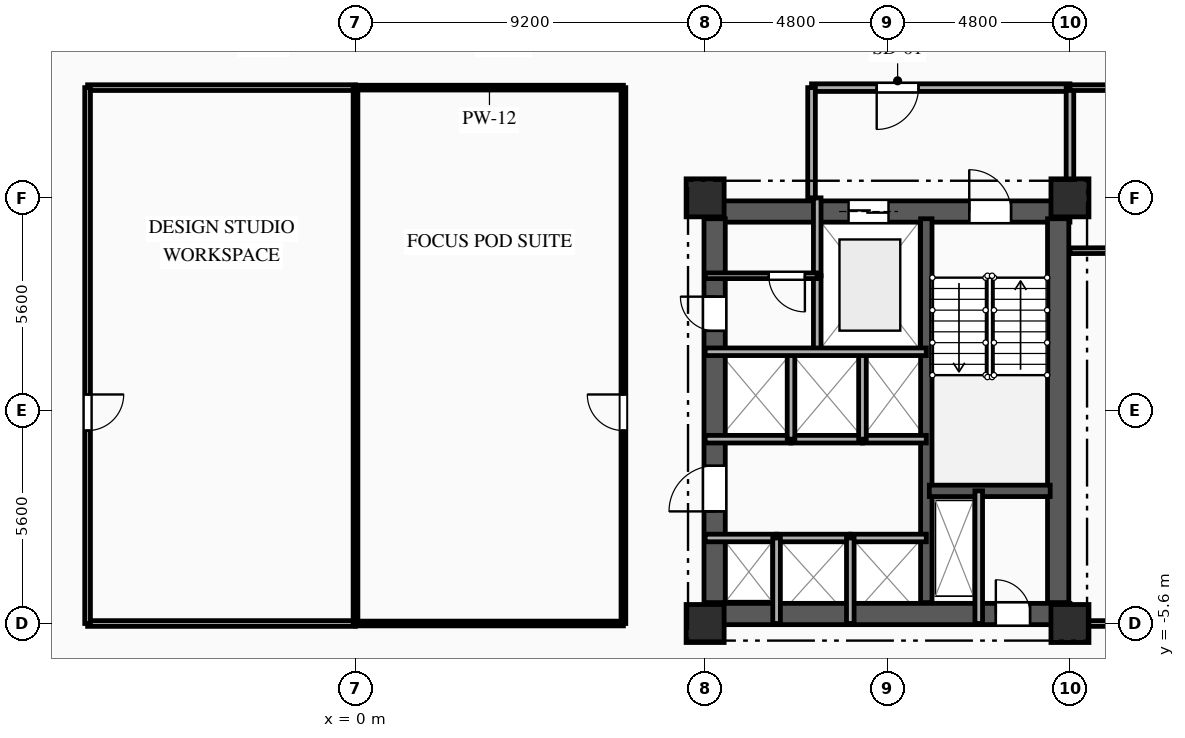
"""IFC4 building model, lengths in metres.
Left out: names, types, materials, properties, quantities, classifications, styles, units other than length and angle.
Written with IfcOpenShell. Run it as: python <this file> out.ifc"""

import sys

from ifc_helpers import new_model, si_unit, direction, frame, frame_2d, origin, origin_2d, place, context, subcontext, project, spatial, rectangle, extrude, element, fill, save


model = new_model("IFC4")
c1 = context("Model", 3, precision=1e-05, world=origin(), true_north=direction((0.0, 1.0)))
c2 = subcontext(c1, "Body", "Model", "MODEL_VIEW")
j1 = project(units=[si_unit("LENGTHUNIT", "METRE"), si_unit("PLANEANGLEUNIT", "RADIAN")], contexts=[c1])
p1 = place(None, origin())
s1 = spatial("IfcSite", under=j1, at=p1, CompositionType="ELEMENT")
p2 = place(p1, origin())
s2 = spatial("IfcBuilding", under=s1, at=p2, CompositionType="ELEMENT")
p3 = place(p2, frame((0.0, 0.0, 112.5)))
s3 = spatial("IfcBuildingStorey", under=s2, at=p3, CompositionType="ELEMENT", Elevation=112.5)
for number, where, z_axis, x_axis in (
    (1, (9.2, -5.6, 0.0), (0.0, 0.0, 1.0), (1.0, 0.0, 0.0)),
    (2, (9.2, 5.6, 0.0), (0.0, 0.0, 1.0), (1.0, 0.0, 0.0)),
    (3, (18.8, -5.6, 0.0), (0.0, 0.0, 1.0), (1.0, 0.0, 0.0)),
    (4, (18.8, 5.6, 0.0), (0.0, 0.0, 1.0), (1.0, 0.0, 0.0)),
):
    element("IfcColumn", number, at=place(p3, frame(where, z_axis=z_axis, x_axis=x_axis)), inside=s3, PredefinedType="COLUMN", context=c2, shape_type="SweptSolid", body=[
        extrude(rectangle(XDim=1.0, YDim=1.0, at=origin_2d()), origin(), (0.0, 0.0, 1.0), 3.35),
    ])
p4 = place(p3, frame((9.2, 5.24, 0.0), z_axis=(0.0, 0.0, 1.0), x_axis=(1.0, 0.0, 0.0)))
e5 = element("IfcWall", 5, at=p4, inside=s3, PredefinedType="SHEAR", context=c2, shape_type="SweptSolid", body=[
    extrude(rectangle(XDim=9.6, YDim=0.56, at=frame_2d((4.8, 0.0))), origin(), (0.0, 0.0, 1.0), 3.045),
])
p5 = place(p4, frame((6.95, 0.0, 0.0)))
e6 = element("IfcOpeningElement", 6, at=p5, cuts=e5, PredefinedType="OPENING", context=c2, shape_type="SweptSolid", body=[
    extrude(rectangle(XDim=1.1, YDim=2.15, at=frame_2d((0.55, 1.075))), frame((0.0, 0.29, 0.0), z_axis=(0.0, -1.0, 0.0), x_axis=(1.0, 0.0, 0.0)), (0.0, 0.0, 1.0), 0.58),
])
p6 = place(p4, frame((3.775, 0.0, 0.0)))
e7 = element("IfcOpeningElement", 7, at=p6, cuts=e5, PredefinedType="OPENING", context=c2, shape_type="SweptSolid", body=[
    extrude(rectangle(XDim=1.05, YDim=2.1, at=frame_2d((0.525, 1.05))), frame((0.0, 0.29, 0.0), z_axis=(0.0, -1.0, 0.0), x_axis=(1.0, 0.0, 0.0)), (0.0, 0.0, 1.0), 0.58),
])
p7 = place(p3, frame((9.2, -5.35, 0.0), z_axis=(0.0, 0.0, 1.0), x_axis=(1.0, 0.0, 0.0)))
e8 = element("IfcWall", 8, at=p7, inside=s3, PredefinedType="SHEAR", context=c2, shape_type="SweptSolid", body=[
    extrude(rectangle(XDim=9.6, YDim=0.56, at=frame_2d((4.8, 0.0))), origin(), (0.0, 0.0, 1.0), 3.045),
])
p8 = place(p7, frame((7.65, 0.0, 0.0)))
e9 = element("IfcOpeningElement", 9, at=p8, cuts=e8, PredefinedType="OPENING", context=c2, shape_type="SweptSolid", body=[
    extrude(rectangle(XDim=0.9, YDim=2.1, at=frame_2d((0.45, 1.05))), frame((0.0, 0.29, 0.0), z_axis=(0.0, -1.0, 0.0), x_axis=(1.0, 0.0, 0.0)), (0.0, 0.0, 1.0), 0.58),
])
p9 = place(p3, frame((9.45, -5.05, 0.0), z_axis=(0.0, 0.0, 1.0), x_axis=(0.0, 1.0, 0.0)))
e10 = element("IfcWall", 10, at=p9, inside=s3, PredefinedType="SHEAR", context=c2, shape_type="SweptSolid", body=[
    extrude(rectangle(XDim=10.1, YDim=0.56, at=frame_2d((5.05, 0.0))), origin(), (0.0, 0.0, 1.0), 3.045),
])
p10 = place(p9, frame((7.15, 0.0, 0.0)))
e11 = element("IfcOpeningElement", 11, at=p10, cuts=e10, PredefinedType="OPENING", context=c2, shape_type="SweptSolid", body=[
    extrude(rectangle(XDim=0.9, YDim=2.1, at=frame_2d((0.45, 1.05))), frame((0.0, 0.29, 0.0), z_axis=(0.0, -1.0, 0.0), x_axis=(1.0, 0.0, 0.0)), (0.0, 0.0, 1.0), 0.58),
])
p11 = place(p9, frame((2.4, 0.0, 0.0)))
e12 = element("IfcOpeningElement", 12, at=p11, cuts=e10, PredefinedType="OPENING", context=c2, shape_type="SweptSolid", body=[
    extrude(rectangle(XDim=1.2, YDim=2.15, at=frame_2d((0.6, 1.075))), frame((0.0, 0.29, 0.0), z_axis=(0.0, -1.0, 0.0), x_axis=(1.0, 0.0, 0.0)), (0.0, 0.0, 1.0), 0.58),
])
p12 = place(p3, frame((18.49, -5.05, 0.0), z_axis=(0.0, 0.0, 1.0), x_axis=(0.0, 1.0, 0.0)))
e13 = element("IfcWall", 13, at=p12, inside=s3, PredefinedType="SHEAR", context=c2, shape_type="SweptSolid", body=[
    extrude(rectangle(XDim=10.1, YDim=0.56, at=frame_2d((5.05, 0.0))), origin(), (0.0, 0.0, 1.0), 3.045),
])
p13 = place(p3, frame((15.02, -5.05, 0.0), z_axis=(0.0, 0.0, 1.0), x_axis=(0.0, 1.0, 0.0)))
e14 = element("IfcWall", 14, at=p13, inside=s3, PredefinedType="SHEAR", context=c2, shape_type="SweptSolid", body=[
    extrude(rectangle(XDim=10.1, YDim=0.3, at=frame_2d((5.05, 0.0))), origin(), (0.0, 0.0, 1.0), 3.045),
])
p14 = place(p3, frame((15.1, -2.11, 0.0), z_axis=(0.0, 0.0, 1.0), x_axis=(1.0, 0.0, 0.0)))
e15 = element("IfcWall", 15, at=p14, inside=s3, PredefinedType="SHEAR", context=c2, shape_type="SweptSolid", body=[
    extrude(rectangle(XDim=3.18, YDim=0.3, at=frame_2d((1.59, 0.0))), origin(), (0.0, 0.0, 1.0), 3.045),
])
p15 = place(p3, frame((16.4, -2.11, 0.0), z_axis=(0.0, 0.0, 1.0), x_axis=(0.0, -1.0, 0.0)))
e16 = element("IfcWall", 16, at=p15, inside=s3, PredefinedType="PARTITIONING", context=c2, shape_type="SweptSolid", body=[
    extrude(rectangle(XDim=3.49, YDim=0.2, at=frame_2d((1.745, 0.0))), origin(), (0.0, 0.0, 1.0), 3.045),
])
p16 = place(p3, frame((12.15, 3.55, 0.0), z_axis=(0.0, 0.0, 1.0), x_axis=(0.0, -1.0, 0.0)))
e17 = element("IfcWall", 17, at=p16, inside=s3, PredefinedType="PARTITIONING", context=c2, shape_type="SweptSolid", body=[
    extrude(rectangle(XDim=2.0, YDim=0.2, at=frame_2d((1.0, 0.0))), origin(), (0.0, 0.0, 1.0), 3.045),
])
p17 = place(p3, frame((12.15, 5.6, 0.0), z_axis=(0.0, 0.0, 1.0), x_axis=(0.0, -1.0, 0.0)))
e18 = element("IfcWall", 18, at=p17, inside=s3, PredefinedType="PARTITIONING", context=c2, shape_type="SweptSolid", body=[
    extrude(rectangle(XDim=2.05, YDim=0.2, at=frame_2d((1.025, 0.0))), origin(), (0.0, 0.0, 1.0), 3.045),
])
p18 = place(p3, frame((18.8, 8.5, 0.0), z_axis=(0.0, 0.0, 1.0), x_axis=(-1.0, 0.0, 0.0)))
e19 = element("IfcWall", 19, at=p18, inside=s3, PredefinedType="PARTITIONING", context=c2, shape_type="SweptSolid", body=[
    extrude(rectangle(XDim=6.8, YDim=0.2, at=frame_2d((3.4, 0.0))), origin(), (0.0, 0.0, 1.0), 3.045),
])
p19 = place(p18, frame((3.985, 0.0, 0.0)))
e20 = element("IfcOpeningElement", 20, at=p19, cuts=e19, PredefinedType="OPENING", context=c2, shape_type="SweptSolid", body=[
    extrude(rectangle(XDim=1.1, YDim=2.15, at=frame_2d((0.55, 1.075))), frame((0.0, 0.11, 0.0), z_axis=(0.0, -1.0, 0.0), x_axis=(1.0, 0.0, 0.0)), (0.0, 0.0, 1.0), 0.22),
])
p20 = place(p3, frame((12.0, 8.5, 0.0), z_axis=(0.0, 0.0, 1.0), x_axis=(0.0, -1.0, 0.0)))
e21 = element("IfcWall", 21, at=p20, inside=s3, PredefinedType="PARTITIONING", context=c2, shape_type="SweptSolid", body=[
    extrude(rectangle(XDim=2.9, YDim=0.2, at=frame_2d((1.45, 0.0))), origin(), (0.0, 0.0, 1.0), 3.045),
])
p21 = place(p3, frame((18.8, 5.6, 0.0), z_axis=(0.0, 0.0, 1.0), x_axis=(0.0, 1.0, 0.0)))
e22 = element("IfcWall", 22, at=p21, inside=s3, PredefinedType="PARTITIONING", context=c2, shape_type="SweptSolid", body=[
    extrude(rectangle(XDim=2.9, YDim=0.2, at=frame_2d((1.45, 0.0))), origin(), (0.0, 0.0, 1.0), 2.53),
])
p22 = place(p3, frame((12.15, 3.55, 0.0), z_axis=(0.0, 0.0, 1.0), x_axis=(-1.0, 0.0, 0.0)))
e23 = element("IfcWall", 23, at=p22, inside=s3, PredefinedType="PARTITIONING", context=c2, shape_type="SweptSolid", body=[
    extrude(rectangle(XDim=2.95, YDim=0.15, at=frame_2d((1.475, 0.0))), origin(), (0.0, 0.0, 1.0), 3.045),
])
p23 = place(p22, frame((0.325, 0.0, 0.0)))
e24 = element("IfcOpeningElement", 24, at=p23, cuts=e23, PredefinedType="OPENING", context=c2, shape_type="SweptSolid", body=[
    extrude(rectangle(XDim=0.95, YDim=2.1, at=frame_2d((0.475, 1.05))), frame((0.0, 0.085, 0.0), z_axis=(0.0, -1.0, 0.0), x_axis=(1.0, 0.0, 0.0)), (0.0, 0.0, 1.0), 0.17),
])
p24 = place(p3, frame((9.2, -3.35, 0.0), z_axis=(0.0, 0.0, 1.0), x_axis=(1.0, 0.0, 0.0)))
e25 = element("IfcWall", 25, at=p24, inside=s3, PredefinedType="PARTITIONING", context=c2, shape_type="SweptSolid", body=[
    extrude(rectangle(XDim=1.88, YDim=0.2, at=frame_2d((0.94, 0.0))), origin(), (0.0, 0.0, 1.0), 2.76),
])
p25 = place(p3, frame((11.08, -3.35, 0.0), z_axis=(0.0, 0.0, 1.0), x_axis=(1.0, 0.0, 0.0)))
e26 = element("IfcWall", 26, at=p25, inside=s3, PredefinedType="PARTITIONING", context=c2, shape_type="SweptSolid", body=[
    extrude(rectangle(XDim=1.94, YDim=0.2, at=frame_2d((0.97, 0.0))), origin(), (0.0, 0.0, 1.0), 3.045),
])
p26 = place(p3, frame((13.02, -3.35, 0.0), z_axis=(0.0, 0.0, 1.0), x_axis=(1.0, 0.0, 0.0)))
e27 = element("IfcWall", 27, at=p26, inside=s3, PredefinedType="PARTITIONING", context=c2, shape_type="SweptSolid", body=[
    extrude(rectangle(XDim=2.0, YDim=0.2, at=frame_2d((1.0, 0.0))), origin(), (0.0, 0.0, 1.0), 3.045),
])
p27 = place(p3, frame((11.46, -0.75, 0.0), z_axis=(0.0, 0.0, 1.0), x_axis=(-1.0, 0.0, 0.0)))
e28 = element("IfcWall", 28, at=p27, inside=s3, PredefinedType="PARTITIONING", context=c2, shape_type="SweptSolid", body=[
    extrude(rectangle(XDim=2.26, YDim=0.2, at=frame_2d((1.13, 0.0))), origin(), (0.0, 0.0, 1.0), 3.045),
])
p28 = place(p3, frame((13.34, -0.75, 0.0), z_axis=(0.0, 0.0, 1.0), x_axis=(-1.0, 0.0, 0.0)))
e29 = element("IfcWall", 29, at=p28, inside=s3, PredefinedType="PARTITIONING", context=c2, shape_type="SweptSolid", body=[
    extrude(rectangle(XDim=1.88, YDim=0.2, at=frame_2d((0.94, 0.0))), origin(), (0.0, 0.0, 1.0), 3.045),
])
p29 = place(p3, frame((15.02, -0.75, 0.0), z_axis=(0.0, 0.0, 1.0), x_axis=(-1.0, 0.0, 0.0)))
e30 = element("IfcWall", 30, at=p29, inside=s3, PredefinedType="PARTITIONING", context=c2, shape_type="SweptSolid", body=[
    extrude(rectangle(XDim=1.68, YDim=0.2, at=frame_2d((0.84, 0.0))), origin(), (0.0, 0.0, 1.0), 3.045),
])
for number, where, z_axis, x_axis in (
    (31, (11.08, -5.6, 0.0), (0.0, 0.0, 1.0), (0.0, 1.0, 0.0)),
    (32, (13.02, -5.6, 0.0), (0.0, 0.0, 1.0), (0.0, 1.0, 0.0)),
):
    element("IfcWall", number, at=place(p3, frame(where, z_axis=z_axis, x_axis=x_axis)), inside=s3, PredefinedType="PARTITIONING", context=c2, shape_type="SweptSolid", body=[
        extrude(rectangle(XDim=2.25, YDim=0.2, at=frame_2d((1.125, 0.0))), origin(), (0.0, 0.0, 1.0), 3.045),
    ])
for number, where, z_axis, x_axis in (
    (33, (11.46, -0.75, 0.0), (0.0, 0.0, 1.0), (0.0, 1.0, 0.0)),
    (34, (13.34, -0.75, 0.0), (0.0, 0.0, 1.0), (0.0, 1.0, 0.0)),
):
    element("IfcWall", number, at=place(p3, frame(where, z_axis=z_axis, x_axis=x_axis)), inside=s3, PredefinedType="PARTITIONING", context=c2, shape_type="SweptSolid", body=[
        extrude(rectangle(XDim=2.3, YDim=0.2, at=frame_2d((1.15, 0.0))), origin(), (0.0, 0.0, 1.0), 3.045),
    ])
p30 = place(p3, frame((0.0, 8.5, 0.0), z_axis=(0.0, 0.0, 1.0), x_axis=(-1.0, 0.0, 0.0)))
e35 = element("IfcWall", 35, at=p30, inside=s3, PredefinedType="PARTITIONING", context=c2, shape_type="SweptSolid", body=[
    extrude(rectangle(XDim=7.05, YDim=0.15, at=frame_2d((3.525, 0.0))), origin(), (0.0, 0.0, 1.0), 3.045),
])
p31 = place(p3, frame((23.0, 8.5, 0.0), z_axis=(0.0, 0.0, 1.0), x_axis=(-1.0, 0.0, 0.0)))
e36 = element("IfcWall", 36, at=p31, inside=s3, PredefinedType="PARTITIONING", context=c2, shape_type="SweptSolid", body=[
    extrude(rectangle(XDim=4.2, YDim=0.15, at=frame_2d((2.1, 0.0))), origin(), (0.0, 0.0, 1.0), 3.045),
])
p32 = place(p31, frame((0.829, 0.0, 0.0)))
e37 = element("IfcOpeningElement", 37, at=p32, cuts=e36, PredefinedType="OPENING", context=c2, shape_type="SweptSolid", body=[
    extrude(rectangle(XDim=1.05, YDim=2.15, at=frame_2d((0.525, 1.075))), frame((0.0, 0.085, 0.0), z_axis=(0.0, -1.0, 0.0), x_axis=(1.0, 0.0, 0.0)), (0.0, 0.0, 1.0), 0.17),
])
p33 = place(p3, frame((7.05, 8.5, 0.0), z_axis=(0.0, 0.0, 1.0), x_axis=(-1.0, 0.0, 0.0)))
e38 = element("IfcWall", 38, at=p33, inside=s3, PredefinedType="PARTITIONING", context=c2, shape_type="SweptSolid", body=[
    extrude(rectangle(XDim=7.05, YDim=0.125, at=frame_2d((3.525, 0.0))), origin(), (0.0, 0.0, 1.0), 3.045),
])
p34 = place(p3, frame((-7.05, -5.6, 0.0), z_axis=(0.0, 0.0, 1.0), x_axis=(1.0, 0.0, 0.0)))
e39 = element("IfcWall", 39, at=p34, inside=s3, PredefinedType="PARTITIONING", context=c2, shape_type="SweptSolid", body=[
    extrude(rectangle(XDim=7.05, YDim=0.15, at=frame_2d((3.525, 0.0))), origin(), (0.0, 0.0, 1.0), 2.53),
])
p35 = place(p3, frame((18.8, -5.6, 0.0), z_axis=(0.0, 0.0, 1.0), x_axis=(1.0, 0.0, 0.0)))
e40 = element("IfcWall", 40, at=p35, inside=s3, PredefinedType="PARTITIONING", context=c2, shape_type="SweptSolid", body=[
    extrude(rectangle(XDim=4.2, YDim=0.15, at=frame_2d((2.1, 0.0))), origin(), (0.0, 0.0, 1.0), 2.53),
])
p36 = place(p35, frame((2.321, 0.0, 0.0)))
e41 = element("IfcOpeningElement", 41, at=p36, cuts=e40, PredefinedType="OPENING", context=c2, shape_type="SweptSolid", body=[
    extrude(rectangle(XDim=1.05, YDim=2.15, at=frame_2d((0.525, 1.075))), frame((0.0, 0.085, 0.0), z_axis=(0.0, -1.0, 0.0), x_axis=(1.0, 0.0, 0.0)), (0.0, 0.0, 1.0), 0.17),
])
p37 = place(p3, frame((0.0, -5.6, 0.0), z_axis=(0.0, 0.0, 1.0), x_axis=(1.0, 0.0, 0.0)))
e42 = element("IfcWall", 42, at=p37, inside=s3, PredefinedType="PARTITIONING", context=c2, shape_type="SweptSolid", body=[
    extrude(rectangle(XDim=7.05, YDim=0.125, at=frame_2d((3.525, 0.0))), origin(), (0.0, 0.0, 1.0), 2.53),
])
p38 = place(p3, frame((-7.05, 8.5, 0.0), z_axis=(0.0, 0.0, 1.0), x_axis=(0.0, -1.0, 0.0)))
e43 = element("IfcWall", 43, at=p38, inside=s3, PredefinedType="PARTITIONING", context=c2, shape_type="SweptSolid", body=[
    extrude(rectangle(XDim=14.1, YDim=0.15, at=frame_2d((7.05, 0.0))), origin(), (0.0, 0.0, 1.0), 3.045),
])
p39 = place(p38, frame((8.074, 0.0, 0.0)))
e44 = element("IfcOpeningElement", 44, at=p39, cuts=e43, PredefinedType="OPENING", context=c2, shape_type="SweptSolid", body=[
    extrude(rectangle(XDim=0.95, YDim=2.1, at=frame_2d((0.475, 1.05))), frame((0.0, 0.085, 0.0), z_axis=(0.0, -1.0, 0.0), x_axis=(1.0, 0.0, 0.0)), (0.0, 0.0, 1.0), 0.17),
])
p40 = place(p3, frame((7.05, -5.6, 0.0), z_axis=(0.0, 0.0, 1.0), x_axis=(0.0, 1.0, 0.0)))
e45 = element("IfcWall", 45, at=p40, inside=s3, PredefinedType="PARTITIONING", context=c2, shape_type="SweptSolid", body=[
    extrude(rectangle(XDim=14.1, YDim=0.125, at=frame_2d((7.05, 0.0))), origin(), (0.0, 0.0, 1.0), 3.045),
])
p41 = place(p40, frame((5.076, 0.0, 0.0)))
e46 = element("IfcOpeningElement", 46, at=p41, cuts=e45, PredefinedType="OPENING", context=c2, shape_type="SweptSolid", body=[
    extrude(rectangle(XDim=0.95, YDim=2.1, at=frame_2d((0.475, 1.05))), frame((0.0, 0.073, 0.0), z_axis=(0.0, -1.0, 0.0), x_axis=(1.0, 0.0, 0.0)), (0.0, 0.0, 1.0), 0.145),
])
p42 = place(p3, frame((18.8, 4.208, 0.0), z_axis=(0.0, 0.0, 1.0), x_axis=(0.9999942944, 0.003378042094, 0.0)))
e47 = element("IfcWall", 47, at=p42, inside=s3, PredefinedType="PARTITIONING", context=c2, shape_type="SweptSolid", body=[
    extrude(rectangle(XDim=13.009, YDim=0.15, at=frame_2d((6.504, 0.0))), origin(), (0.0, 0.0, 1.0), 3.045),
])
p43 = place(p3, frame((0.0, 8.5, 0.0), z_axis=(0.0, 0.0, 1.0), x_axis=(0.0, -1.0, 0.0)))
e48 = element("IfcWall", 48, at=p43, inside=s3, PredefinedType="PARTITIONING", context=c2, shape_type="SweptSolid", body=[
    extrude(rectangle(XDim=14.1, YDim=0.125, at=frame_2d((7.05, 0.0))), origin(), (0.0, 0.0, 1.0), 3.045),
])
p44 = place(p3, frame((9.2, 1.55, 0.0), z_axis=(0.0, 0.0, 1.0), x_axis=(1.0, 0.0, 0.0)))
e49 = element("IfcWall", 49, at=p44, inside=s3, PredefinedType="PARTITIONING", context=c2, shape_type="SweptSolid", body=[
    extrude(rectangle(XDim=5.82, YDim=0.2, at=frame_2d((2.91, 0.0))), origin(), (0.0, 0.0, 1.0), 3.045),
])
p45 = place(p5, origin())
e50 = element("IfcDoor", 50, at=p45, inside=s3, OperationType="SINGLE_SWING_LEFT", PredefinedType="DOOR", context=c2, shape_type="SweptSolid", body=[
    extrude(rectangle(XDim=1.1, YDim=2.15, at=frame_2d((0.55, 1.075))), frame((0.0, 0.025, 0.0), z_axis=(0.0, -1.0, 0.0), x_axis=(1.0, 0.0, 0.0)), (0.0, 0.0, 1.0), 0.05),
])
fill(e6, e50)
p46 = place(p6, origin())
e51 = element("IfcDoor", 51, at=p46, inside=s3, OperationType="DOUBLE_DOOR_SLIDING", PredefinedType="DOOR", context=c2, shape_type="SweptSolid", body=[
    extrude(rectangle(XDim=1.05, YDim=2.1, at=frame_2d((0.525, 1.05))), frame((0.0, 0.025, 0.0), z_axis=(0.0, -1.0, 0.0), x_axis=(1.0, 0.0, 0.0)), (0.0, 0.0, 1.0), 0.05),
])
fill(e7, e51)
p47 = place(p8, origin())
e52 = element("IfcDoor", 52, at=p47, inside=s3, OperationType="SINGLE_SWING_LEFT", PredefinedType="DOOR", context=c2, shape_type="SweptSolid", body=[
    extrude(rectangle(XDim=0.9, YDim=2.1, at=frame_2d((0.45, 1.05))), frame((0.0, 0.025, 0.0), z_axis=(0.0, -1.0, 0.0), x_axis=(1.0, 0.0, 0.0)), (0.0, 0.0, 1.0), 0.05),
])
fill(e9, e52)
p48 = place(p19, origin())
e53 = element("IfcDoor", 53, at=p48, inside=s3, OperationType="SINGLE_SWING_RIGHT", PredefinedType="DOOR", context=c2, shape_type="SweptSolid", body=[
    extrude(rectangle(XDim=1.1, YDim=2.15, at=frame_2d((0.55, 1.075))), frame((0.0, 0.025, 0.0), z_axis=(0.0, -1.0, 0.0), x_axis=(1.0, 0.0, 0.0)), (0.0, 0.0, 1.0), 0.05),
])
fill(e20, e53)
p49 = place(p23, origin())
e54 = element("IfcDoor", 54, at=p49, inside=s3, OperationType="SINGLE_SWING_LEFT", PredefinedType="DOOR", context=c2, shape_type="SweptSolid", body=[
    extrude(rectangle(XDim=0.95, YDim=2.1, at=frame_2d((0.475, 1.05))), frame((0.0, 0.025, 0.0), z_axis=(0.0, -1.0, 0.0), x_axis=(1.0, 0.0, 0.0)), (0.0, 0.0, 1.0), 0.05),
])
fill(e24, e54)
p50 = place(p10, origin())
e55 = element("IfcDoor", 55, at=p50, inside=s3, OperationType="SINGLE_SWING_RIGHT", PredefinedType="DOOR", context=c2, shape_type="SweptSolid", body=[
    extrude(rectangle(XDim=0.9, YDim=2.1, at=frame_2d((0.45, 1.05))), frame((0.0, 0.025, 0.0), z_axis=(0.0, -1.0, 0.0), x_axis=(1.0, 0.0, 0.0)), (0.0, 0.0, 1.0), 0.05),
])
fill(e11, e55)
p51 = place(p11, origin())
e56 = element("IfcDoor", 56, at=p51, inside=s3, OperationType="SINGLE_SWING_LEFT", PredefinedType="DOOR", context=c2, shape_type="SweptSolid", body=[
    extrude(rectangle(XDim=1.2, YDim=2.15, at=frame_2d((0.6, 1.075))), frame((0.0, 0.025, 0.0), z_axis=(0.0, -1.0, 0.0), x_axis=(1.0, 0.0, 0.0)), (0.0, 0.0, 1.0), 0.05),
])
fill(e12, e56)
p52 = place(p39, origin())
e57 = element("IfcDoor", 57, at=p52, inside=s3, OperationType="SINGLE_SWING_LEFT", PredefinedType="DOOR", context=c2, shape_type="SweptSolid", body=[
    extrude(rectangle(XDim=0.95, YDim=2.1, at=frame_2d((0.475, 1.05))), frame((0.0, 0.025, 0.0), z_axis=(0.0, -1.0, 0.0), x_axis=(1.0, 0.0, 0.0)), (0.0, 0.0, 1.0), 0.05),
])
fill(e44, e57)
p53 = place(p41, origin())
e58 = element("IfcDoor", 58, at=p53, inside=s3, OperationType="SINGLE_SWING_RIGHT", PredefinedType="DOOR", context=c2, shape_type="SweptSolid", body=[
    extrude(rectangle(XDim=0.95, YDim=2.1, at=frame_2d((0.475, 1.05))), frame((0.0, 0.025, 0.0), z_axis=(0.0, -1.0, 0.0), x_axis=(1.0, 0.0, 0.0)), (0.0, 0.0, 1.0), 0.05),
])
fill(e46, e58)
save(model, sys.argv[1])
